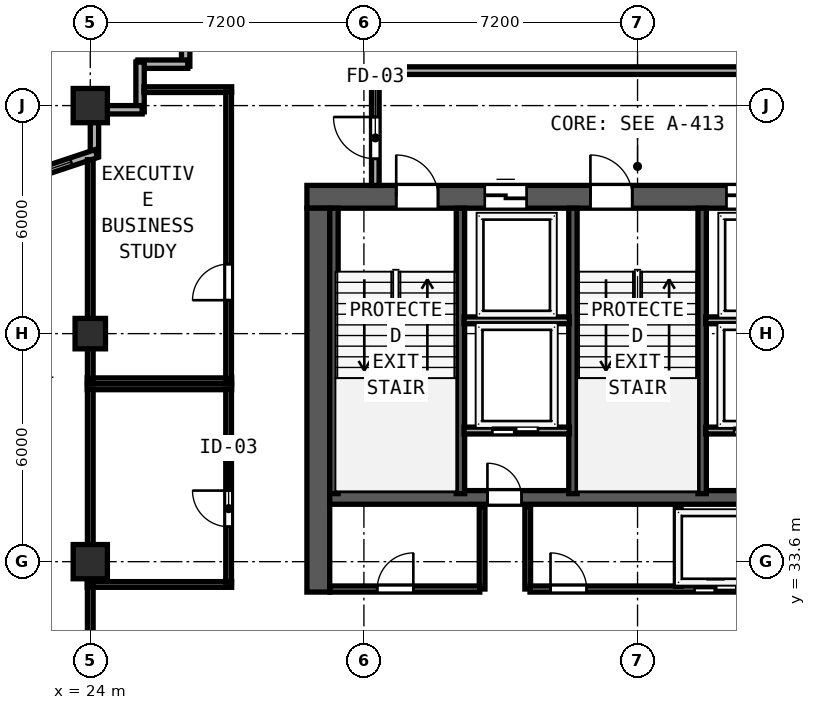
"""IFC4 building model, lengths in metres.
Left out: names, types, materials, properties, quantities, classifications, styles, units other than length and angle.
Written with IfcOpenShell. Run it as: python <this file> out.ifc"""

import sys

from ifc_helpers import new_model, si_unit, direction, frame, frame_2d, origin, origin_2d, place, context, subcontext, project, spatial, rectangle, hollow_rectangle, extrude, element, fill, save


model = new_model("IFC4")
c1 = context("Model", 3, precision=1e-05, world=origin(), true_north=direction((0.0, 1.0)))
c2 = subcontext(c1, "Body", "Model", "MODEL_VIEW")
j1 = project(units=[si_unit("LENGTHUNIT", "METRE"), si_unit("PLANEANGLEUNIT", "RADIAN")], contexts=[c1])
p1 = place(None, origin())
s1 = spatial("IfcSite", under=j1, at=p1, CompositionType="ELEMENT")
p2 = place(p1, origin())
s2 = spatial("IfcBuilding", under=s1, at=p2, CompositionType="ELEMENT")
p3 = place(p2, frame((0.0, 0.0, 199.4)))
s3 = spatial("IfcBuildingStorey", under=s2, at=p3, CompositionType="ELEMENT", Elevation=199.4)
p4 = place(p3, frame((29.7, 43.2, 0.0), z_axis=(0.0, 0.0, 1.0), x_axis=(1.0, 0.0, 0.0)))
e1 = element("IfcWall", 1, at=p4, inside=s3, PredefinedType="SHEAR", context=c2, shape_type="SweptSolid", body=[
    extrude(rectangle(XDim=17.4, YDim=0.6, at=frame_2d((8.7, 0.0))), origin(), (0.0, 0.0, 1.0), 3.62),
])
p5 = place(p4, frame((2.35, 0.0, 0.0)))
e2 = element("IfcOpeningElement", 2, at=p5, cuts=e1, PredefinedType="OPENING", context=c2, shape_type="SweptSolid", body=[
    extrude(rectangle(XDim=1.1, YDim=2.15, at=frame_2d((0.55, 1.075))), frame((0.0, 0.31, 0.0), z_axis=(0.0, -1.0, 0.0), x_axis=(1.0, 0.0, 0.0)), (0.0, 0.0, 1.0), 0.62),
])
p6 = place(p4, frame((7.46, 0.0, 0.0)))
e3 = element("IfcOpeningElement", 3, at=p6, cuts=e1, PredefinedType="OPENING", context=c2, shape_type="SweptSolid", body=[
    extrude(rectangle(XDim=1.1, YDim=2.15, at=frame_2d((0.55, 1.075))), frame((0.0, 0.31, 0.0), z_axis=(0.0, -1.0, 0.0), x_axis=(1.0, 0.0, 0.0)), (0.0, 0.0, 1.0), 0.62),
])
p7 = place(p4, frame((13.55, 0.0, 0.0)))
e4 = element("IfcOpeningElement", 4, at=p7, cuts=e1, PredefinedType="OPENING", context=c2, shape_type="SweptSolid", body=[
    extrude(rectangle(XDim=1.1, YDim=2.15, at=frame_2d((0.55, 1.075))), frame((0.0, 0.31, 0.0), z_axis=(0.0, -1.0, 0.0), x_axis=(1.0, 0.0, 0.0)), (0.0, 0.0, 1.0), 0.62),
])
p8 = place(p4, frame((4.68, 0.0, 0.0)))
e5 = element("IfcOpeningElement", 5, at=p8, cuts=e1, PredefinedType="OPENING", context=c2, shape_type="SweptSolid", body=[
    extrude(rectangle(XDim=1.1, YDim=2.2, at=frame_2d((0.55, 1.1))), frame((0.0, 0.31, 0.0), z_axis=(0.0, -1.0, 0.0), x_axis=(1.0, 0.0, 0.0)), (0.0, 0.0, 1.0), 0.62),
])
p9 = place(p4, frame((11.04, 0.0, 0.0)))
e6 = element("IfcOpeningElement", 6, at=p9, cuts=e1, PredefinedType="OPENING", context=c2, shape_type="SweptSolid", body=[
    extrude(rectangle(XDim=1.1, YDim=2.2, at=frame_2d((0.55, 1.1))), frame((0.0, 0.31, 0.0), z_axis=(0.0, -1.0, 0.0), x_axis=(1.0, 0.0, 0.0)), (0.0, 0.0, 1.0), 0.62),
])
p10 = place(p3, frame((30.0, 32.8, 0.0), z_axis=(0.0, 0.0, 1.0), x_axis=(0.0, 1.0, 0.0)))
e7 = element("IfcWall", 7, at=p10, inside=s3, PredefinedType="SHEAR", context=c2, shape_type="SweptSolid", body=[
    extrude(rectangle(XDim=10.1, YDim=0.6, at=frame_2d((5.05, 0.0))), origin(), (0.0, 0.0, 1.0), 3.62),
])
p11 = place(p3, frame((30.3, 35.29, 0.0), z_axis=(0.0, 0.0, 1.0), x_axis=(1.0, 0.0, 0.0)))
e8 = element("IfcWall", 8, at=p11, inside=s3, PredefinedType="SHEAR", context=c2, shape_type="SweptSolid", body=[
    extrude(rectangle(XDim=16.2, YDim=0.36, at=frame_2d((8.1, 0.0))), origin(), (0.0, 0.0, 1.0), 3.62),
])
p12 = place(p11, frame((5.05, 0.0, 0.0), z_axis=(0.0, 0.0, 1.0), x_axis=(-1.0, 0.0, 0.0)))
e9 = element("IfcOpeningElement", 9, at=p12, cuts=e8, PredefinedType="OPENING", context=c2, shape_type="SweptSolid", body=[
    extrude(rectangle(XDim=0.9, YDim=2.1, at=frame_2d((0.45, 1.05))), frame((0.0, 0.19, 0.0), z_axis=(0.0, -1.0, 0.0), x_axis=(1.0, 0.0, 0.0)), (0.0, 0.0, 1.0), 0.38),
])
p13 = place(p11, frame((12.11, 0.0, 0.0), z_axis=(0.0, 0.0, 1.0), x_axis=(-1.0, 0.0, 0.0)))
e10 = element("IfcOpeningElement", 10, at=p13, cuts=e8, PredefinedType="OPENING", context=c2, shape_type="SweptSolid", body=[
    extrude(rectangle(XDim=0.9, YDim=2.1, at=frame_2d((0.45, 1.05))), frame((0.0, 0.19, 0.0), z_axis=(0.0, -1.0, 0.0), x_axis=(1.0, 0.0, 0.0)), (0.0, 0.0, 1.0), 0.38),
])
for number, where, z_axis, x_axis in (
    (11, (30.412, 35.39, 0.0), (0.0, 0.0, 1.0), (0.0, 1.0, 0.0)),
    (12, (33.74, 35.39, 0.0), (0.0, 0.0, 1.0), (0.0, 1.0, 0.0)),
    (13, (36.7, 35.39, 0.0), (0.0, 0.0, 1.0), (0.0, 1.0, 0.0)),
    (14, (40.1, 35.39, 0.0), (0.0, 0.0, 1.0), (0.0, 1.0, 0.0)),
):
    element("IfcWall", number, at=place(p3, frame(where, z_axis=z_axis, x_axis=x_axis)), inside=s3, PredefinedType="SHEAR", context=c2, shape_type="SweptSolid", body=[
        extrude(rectangle(XDim=7.51, YDim=0.22, at=frame_2d((3.755, 0.0))), origin(), (0.0, 0.0, 1.0), 3.62),
    ])
for number, where, z_axis, x_axis in (
    (15, (24.0, 33.6, 0.0), (0.0, 0.0, 1.0), (1.0, 0.0, 0.0)),
    (16, (24.0, 45.6, 0.0), (0.0, 0.0, 1.0), (1.0, 0.0, 0.0)),
):
    element("IfcColumn", number, at=place(p3, frame(where, z_axis=z_axis, x_axis=x_axis)), inside=s3, PredefinedType="COLUMN", context=c2, shape_type="SweptSolid", body=[
        extrude(hollow_rectangle(XDim=0.9, YDim=0.9, WallThickness=0.034, at=origin_2d()), origin(), (0.0, 0.0, 1.0), 3.8),
    ])
p14 = place(p3, frame((24.0, 39.6, 0.0), z_axis=(0.0, 0.0, 1.0), x_axis=(1.0, 0.0, 0.0)))
e17 = element("IfcColumn", 17, at=p14, inside=s3, PredefinedType="COLUMN", context=c2, shape_type="SweptSolid", body=[
    extrude(hollow_rectangle(XDim=0.8, YDim=0.8, WallThickness=0.03, at=origin_2d()), origin(), (0.0, 0.0, 1.0), 3.8),
])
p15 = place(p3, frame((26.51, 48.0, 0.0), z_axis=(0.0, 0.0, 1.0), x_axis=(0.0, -1.0, 0.0)))
e18 = element("IfcWall", 18, at=p15, inside=s3, PredefinedType="SOLIDWALL", context=c2, shape_type="SweptSolid", body=[
    extrude(rectangle(XDim=1.365, YDim=0.22, at=frame_2d((0.683, 0.0))), origin(), (0.0, 0.0, 1.0), 3.62),
])
for number, where, z_axis, x_axis in (
    (19, (26.565, 46.69, 0.0), (0.0, 0.0, 1.0), (-1.0, 0.0, 0.0)),
    (20, (25.31, 46.745, 0.0), (0.0, 0.0, 1.0), (0.0, -1.0, 0.0)),
):
    element("IfcWall", number, at=place(p3, frame(where, z_axis=z_axis, x_axis=x_axis)), inside=s3, PredefinedType="SOLIDWALL", context=c2, shape_type="SweptSolid", body=[
        extrude(rectangle(XDim=1.31, YDim=0.22, at=frame_2d((0.655, 0.0))), origin(), (0.0, 0.0, 1.0), 3.62),
    ])
p16 = place(p3, frame((25.365, 45.49, 0.0), z_axis=(0.0, 0.0, 1.0), x_axis=(-1.0, 0.0, 0.0)))
e21 = element("IfcWall", 21, at=p16, inside=s3, PredefinedType="SOLIDWALL", context=c2, shape_type="SweptSolid", body=[
    extrude(rectangle(XDim=0.923, YDim=0.22, at=frame_2d((0.461, 0.0))), origin(), (0.0, 0.0, 1.0), 3.62),
])
p17 = place(p3, frame((24.11, 45.158, 0.0), z_axis=(0.0, 0.0, 1.0), x_axis=(0.0, -1.0, 0.0)))
e22 = element("IfcWall", 22, at=p17, inside=s3, PredefinedType="SOLIDWALL", context=c2, shape_type="SweptSolid", body=[
    extrude(rectangle(XDim=0.892, YDim=0.22, at=frame_2d((0.446, 0.0))), origin(), (0.0, 0.0, 1.0), 3.215),
])
p18 = place(p3, frame((24.162, 44.338, 0.0), z_axis=(0.0, 0.0, 1.0), x_axis=(-0.948687265055, -0.316215864755, 0.0)))
e23 = element("IfcWall", 23, at=p18, inside=s3, PredefinedType="SOLIDWALL", context=c2, shape_type="SweptSolid", body=[
    extrude(rectangle(XDim=6.154, YDim=0.22, at=frame_2d((3.077, 0.0))), origin(), (0.0, 0.0, 1.0), 3.215),
])
p19 = place(p18, frame((0.7, 0.0, 0.85)))
e24 = element("IfcOpeningElement", 24, at=p19, cuts=e23, PredefinedType="OPENING", context=c2, shape_type="SweptSolid", body=[
    extrude(rectangle(XDim=1.1, YDim=1.75, at=frame_2d((0.55, 0.875))), frame((0.0, 0.12, 0.0), z_axis=(0.0, -1.0, 0.0), x_axis=(1.0, 0.0, 0.0)), (0.0, 0.0, 1.0), 0.24),
])
p20 = place(p3, frame((31.5, 46.52, 0.0), z_axis=(0.0, 0.0, 1.0), x_axis=(1.0, 0.0, 0.0)))
e25 = element("IfcWall", 25, at=p20, inside=s3, PredefinedType="SOLIDWALL", context=c2, shape_type="SweptSolid", body=[
    extrude(rectangle(XDim=13.8, YDim=0.2, at=frame_2d((6.9, 0.0))), origin(), (0.0, 0.0, 1.0), 3.62),
])
p21 = place(p3, frame((31.5, 43.5, 0.0), z_axis=(0.0, 0.0, 1.0), x_axis=(0.0, 1.0, 0.0)))
e26 = element("IfcWall", 26, at=p21, inside=s3, PredefinedType="SOLIDWALL", context=c2, shape_type="SweptSolid", body=[
    extrude(rectangle(XDim=2.935, YDim=0.2, at=frame_2d((1.468, 0.0))), origin(), (0.0, 0.0, 1.0), 3.62),
])
p22 = place(p21, frame((1.8, 0.0, 0.0), z_axis=(0.0, 0.0, 1.0), x_axis=(-1.0, 0.0, 0.0)))
e27 = element("IfcOpeningElement", 27, at=p22, cuts=e26, PredefinedType="OPENING", context=c2, shape_type="SweptSolid", body=[
    extrude(rectangle(XDim=1.1, YDim=2.15, at=frame_2d((0.55, 1.075))), frame((0.0, 0.11, 0.0), z_axis=(0.0, -1.0, 0.0), x_axis=(1.0, 0.0, 0.0)), (0.0, 0.0, 1.0), 0.22),
])
for number, where, z_axis, x_axis in (
    (28, (33.835, 39.95, 0.0), (0.0, 0.0, 1.0), (1.0, 0.0, 0.0)),
    (29, (40.195, 39.95, 0.0), (0.0, 0.0, 1.0), (1.0, 0.0, 0.0)),
):
    element("IfcWall", number, at=place(p3, frame(where, z_axis=z_axis, x_axis=x_axis)), inside=s3, PredefinedType="SOLIDWALL", context=c2, shape_type="SweptSolid", body=[
        extrude(rectangle(XDim=2.77, YDim=0.18, at=frame_2d((1.385, 0.0))), origin(), (0.0, 0.0, 1.0), 3.62),
    ])
p23 = place(p3, frame((33.835, 37.05, 0.0), z_axis=(0.0, 0.0, 1.0), x_axis=(1.0, 0.0, 0.0)))
e30 = element("IfcWall", 30, at=p23, inside=s3, PredefinedType="SOLIDWALL", context=c2, shape_type="SweptSolid", body=[
    extrude(rectangle(XDim=2.77, YDim=0.18, at=frame_2d((1.385, 0.0))), origin(), (0.0, 0.0, 1.0), 3.62),
])
p24 = place(p23, frame((1.945, 0.0, 0.0), z_axis=(0.0, 0.0, 1.0), x_axis=(-1.0, 0.0, 0.0)))
e31 = element("IfcOpeningElement", 31, at=p24, cuts=e30, PredefinedType="OPENING", context=c2, shape_type="SweptSolid", body=[
    extrude(rectangle(XDim=1.2, YDim=2.2, at=frame_2d((0.6, 1.1))), frame((0.0, 0.1, 0.0), z_axis=(0.0, -1.0, 0.0), x_axis=(1.0, 0.0, 0.0)), (0.0, 0.0, 1.0), 0.2),
])
for number, where, z_axis, x_axis in (
    (32, (34.31, 32.88, 0.0), (0.0, 0.0, 1.0), (0.0, 1.0, 0.0)),
    (33, (35.51, 32.88, 0.0), (0.0, 0.0, 1.0), (0.0, 1.0, 0.0)),
):
    element("IfcWall", number, at=place(p3, frame(where, z_axis=z_axis, x_axis=x_axis)), inside=s3, PredefinedType="SOLIDWALL", context=c2, shape_type="SweptSolid", body=[
        extrude(rectangle(XDim=2.17, YDim=0.15, at=frame_2d((1.085, 0.0))), origin(), (0.0, 0.0, 1.0), 3.62),
    ])
p25 = place(p3, frame((40.195, 37.05, 0.0), z_axis=(0.0, 0.0, 1.0), x_axis=(1.0, 0.0, 0.0)))
e34 = element("IfcWall", 34, at=p25, inside=s3, PredefinedType="SOLIDWALL", context=c2, shape_type="SweptSolid", body=[
    extrude(rectangle(XDim=2.77, YDim=0.18, at=frame_2d((1.385, 0.0))), origin(), (0.0, 0.0, 1.0), 3.62),
])
p26 = place(p25, frame((1.945, 0.0, 0.0), z_axis=(0.0, 0.0, 1.0), x_axis=(-1.0, 0.0, 0.0)))
e35 = element("IfcOpeningElement", 35, at=p26, cuts=e34, PredefinedType="OPENING", context=c2, shape_type="SweptSolid", body=[
    extrude(rectangle(XDim=1.2, YDim=2.2, at=frame_2d((0.6, 1.1))), frame((0.0, 0.1, 0.0), z_axis=(0.0, -1.0, 0.0), x_axis=(1.0, 0.0, 0.0)), (0.0, 0.0, 1.0), 0.2),
])
p27 = place(p3, frame((30.3, 32.88, 0.0), z_axis=(0.0, 0.0, 1.0), x_axis=(1.0, 0.0, 0.0)))
e36 = element("IfcWall", 36, at=p27, inside=s3, PredefinedType="SOLIDWALL", context=c2, shape_type="SweptSolid", body=[
    extrude(rectangle(XDim=3.95, YDim=0.16, at=frame_2d((1.975, 0.0))), origin(), (0.0, 0.0, 1.0), 3.62),
])
p28 = place(p27, frame((2.2, 0.0, 0.0), z_axis=(0.0, 0.0, 1.0), x_axis=(-1.0, 0.0, 0.0)))
e37 = element("IfcOpeningElement", 37, at=p28, cuts=e36, PredefinedType="OPENING", context=c2, shape_type="SweptSolid", body=[
    extrude(rectangle(XDim=0.95, YDim=2.12, at=frame_2d((0.475, 1.06))), frame((0.0, 0.09, 0.0), z_axis=(0.0, -1.0, 0.0), x_axis=(1.0, 0.0, 0.0)), (0.0, 0.0, 1.0), 0.18),
])
p29 = place(p3, frame((35.57, 32.88, 0.0), z_axis=(0.0, 0.0, 1.0), x_axis=(1.0, 0.0, 0.0)))
e38 = element("IfcWall", 38, at=p29, inside=s3, PredefinedType="SOLIDWALL", context=c2, shape_type="SweptSolid", body=[
    extrude(rectangle(XDim=5.74, YDim=0.16, at=frame_2d((2.87, 0.0))), origin(), (0.0, 0.0, 1.0), 3.62),
])
p30 = place(p29, frame((1.49, 0.0, 0.0), z_axis=(0.0, 0.0, 1.0), x_axis=(-1.0, 0.0, 0.0)))
e39 = element("IfcOpeningElement", 39, at=p30, cuts=e38, PredefinedType="OPENING", context=c2, shape_type="SweptSolid", body=[
    extrude(rectangle(XDim=0.95, YDim=2.12, at=frame_2d((0.475, 1.06))), frame((0.0, 0.09, 0.0), z_axis=(0.0, -1.0, 0.0), x_axis=(1.0, 0.0, 0.0)), (0.0, 0.0, 1.0), 0.18),
])
p31 = place(p29, frame((5.43, 0.0, 0.0), z_axis=(0.0, 0.0, 1.0), x_axis=(-1.0, 0.0, 0.0)))
e40 = element("IfcOpeningElement", 40, at=p31, cuts=e38, PredefinedType="OPENING", context=c2, shape_type="SweptSolid", body=[
    extrude(rectangle(XDim=1.1, YDim=2.2, at=frame_2d((0.55, 1.1))), frame((0.0, 0.09, 0.0), z_axis=(0.0, -1.0, 0.0), x_axis=(1.0, 0.0, 0.0)), (0.0, 0.0, 1.0), 0.18),
])
p32 = place(p3, frame((39.47, 32.95, 0.0), z_axis=(0.0, 0.0, 1.0), x_axis=(0.0, 1.0, 0.0)))
e41 = element("IfcWall", 41, at=p32, inside=s3, PredefinedType="SOLIDWALL", context=c2, shape_type="SweptSolid", body=[
    extrude(rectangle(XDim=2.05, YDim=0.15, at=frame_2d((1.025, 0.0))), origin(), (0.0, 0.0, 1.0), 3.62),
])
for number, where, z_axis, x_axis in (
    (42, (23.92, 38.2, 0.0), (0.0, 0.0, 1.0), (1.0, 0.0, 0.0)),
    (43, (23.92, 33.0, 0.0), (0.0, 0.0, 1.0), (1.0, 0.0, 0.0)),
):
    element("IfcWall", number, at=place(p3, frame(where, z_axis=z_axis, x_axis=x_axis)), inside=s3, PredefinedType="PARTITIONING", context=c2, shape_type="SweptSolid", body=[
        extrude(rectangle(XDim=3.8, YDim=0.15, at=frame_2d((1.9, 0.0))), origin(), (0.0, 0.0, 1.0), 3.62),
    ])
p33 = place(p3, frame((24.0, 33.06, 0.0), z_axis=(0.0, 0.0, 1.0), x_axis=(0.0, 1.0, 0.0)))
e44 = element("IfcWall", 44, at=p33, inside=s3, PredefinedType="PARTITIONING", context=c2, shape_type="SweptSolid", body=[
    extrude(rectangle(XDim=5.08, YDim=0.15, at=frame_2d((2.54, 0.0))), origin(), (0.0, 0.0, 1.0), 3.215),
])
p34 = place(p3, frame((27.64, 33.06, 0.0), z_axis=(0.0, 0.0, 1.0), x_axis=(0.0, 1.0, 0.0)))
e45 = element("IfcWall", 45, at=p34, inside=s3, PredefinedType="PARTITIONING", context=c2, shape_type="SweptSolid", body=[
    extrude(rectangle(XDim=5.08, YDim=0.15, at=frame_2d((2.54, 0.0))), origin(), (0.0, 0.0, 1.0), 3.62),
])
p35 = place(p34, frame((2.41, 0.0, 0.0), z_axis=(0.0, 0.0, 1.0), x_axis=(-1.0, 0.0, 0.0)))
e46 = element("IfcOpeningElement", 46, at=p35, cuts=e45, PredefinedType="OPENING", context=c2, shape_type="SweptSolid", body=[
    extrude(rectangle(XDim=0.95, YDim=2.12, at=frame_2d((0.475, 1.06))), frame((0.0, 0.085, 0.0), z_axis=(0.0, -1.0, 0.0), x_axis=(1.0, 0.0, 0.0)), (0.0, 0.0, 1.0), 0.17),
])
p36 = place(p3, frame((25.412, 46.02, 0.0), z_axis=(0.0, 0.0, 1.0), x_axis=(1.0, 0.0, 0.0)))
e47 = element("IfcWall", 47, at=p36, inside=s3, PredefinedType="PARTITIONING", context=c2, shape_type="SweptSolid", body=[
    extrude(rectangle(XDim=2.308, YDim=0.15, at=frame_2d((1.154, 0.0))), origin(), (0.0, 0.0, 1.0), 3.62),
])
p37 = place(p3, frame((23.92, 38.36, 0.0), z_axis=(0.0, 0.0, 1.0), x_axis=(1.0, 0.0, 0.0)))
e48 = element("IfcWall", 48, at=p37, inside=s3, PredefinedType="PARTITIONING", context=c2, shape_type="SweptSolid", body=[
    extrude(rectangle(XDim=3.8, YDim=0.15, at=frame_2d((1.9, 0.0))), origin(), (0.0, 0.0, 1.0), 3.62),
])
p38 = place(p3, frame((24.0, 38.42, 0.0), z_axis=(0.0, 0.0, 1.0), x_axis=(0.0, 1.0, 0.0)))
e49 = element("IfcWall", 49, at=p38, inside=s3, PredefinedType="PARTITIONING", context=c2, shape_type="SweptSolid", body=[
    extrude(rectangle(XDim=5.757, YDim=0.15, at=frame_2d((2.878, 0.0))), origin(), (0.0, 0.0, 1.0), 3.215),
])
p39 = place(p3, frame((27.64, 38.42, 0.0), z_axis=(0.0, 0.0, 1.0), x_axis=(0.0, 1.0, 0.0)))
e50 = element("IfcWall", 50, at=p39, inside=s3, PredefinedType="PARTITIONING", context=c2, shape_type="SweptSolid", body=[
    extrude(rectangle(XDim=7.54, YDim=0.15, at=frame_2d((3.77, 0.0))), origin(), (0.0, 0.0, 1.0), 3.62),
])
p40 = place(p39, frame((3.01, 0.0, 0.0), z_axis=(0.0, 0.0, 1.0), x_axis=(-1.0, 0.0, 0.0)))
e51 = element("IfcOpeningElement", 51, at=p40, cuts=e50, PredefinedType="OPENING", context=c2, shape_type="SweptSolid", body=[
    extrude(rectangle(XDim=0.95, YDim=2.12, at=frame_2d((0.475, 1.06))), frame((0.0, 0.085, 0.0), z_axis=(0.0, -1.0, 0.0), x_axis=(1.0, 0.0, 0.0)), (0.0, 0.0, 1.0), 0.17),
])
p41 = place(p3, frame((24.0, 31.39, 0.0), z_axis=(0.0, 0.0, 1.0), x_axis=(0.0, 1.0, 0.0)))
e52 = element("IfcWall", 52, at=p41, inside=s3, PredefinedType="PARTITIONING", context=c2, shape_type="SweptSolid", body=[
    extrude(rectangle(XDim=1.55, YDim=0.15, at=frame_2d((0.775, 0.0))), origin(), (0.0, 0.0, 1.0), 3.215),
])
p42 = place(p19, origin())
e53 = element("IfcWindow", 53, at=p42, inside=s3, PartitioningType="SINGLE_PANEL", PredefinedType="WINDOW", context=c2, shape_type="SweptSolid", body=[
    extrude(rectangle(XDim=1.1, YDim=1.75, at=frame_2d((0.55, 0.875))), frame((0.0, 0.03, 0.0), z_axis=(0.0, -1.0, 0.0), x_axis=(1.0, 0.0, 0.0)), (0.0, 0.0, 1.0), 0.06),
])
fill(e24, e53)
p43 = place(p5, origin())
e54 = element("IfcDoor", 54, at=p43, inside=s3, OperationType="SINGLE_SWING_LEFT", PredefinedType="DOOR", context=c2, shape_type="SweptSolid", body=[
    extrude(rectangle(XDim=1.1, YDim=2.15, at=frame_2d((0.55, 1.075))), frame((0.0, 0.185, 0.0), z_axis=(0.0, -1.0, 0.0), x_axis=(1.0, 0.0, 0.0)), (0.0, 0.0, 1.0), 0.05),
])
fill(e2, e54)
p44 = place(p6, origin())
e55 = element("IfcDoor", 55, at=p44, inside=s3, OperationType="SINGLE_SWING_LEFT", PredefinedType="DOOR", context=c2, shape_type="SweptSolid", body=[
    extrude(rectangle(XDim=1.1, YDim=2.15, at=frame_2d((0.55, 1.075))), frame((0.0, 0.185, 0.0), z_axis=(0.0, -1.0, 0.0), x_axis=(1.0, 0.0, 0.0)), (0.0, 0.0, 1.0), 0.05),
])
fill(e3, e55)
p45 = place(p22, origin())
e56 = element("IfcDoor", 56, at=p45, inside=s3, OperationType="SINGLE_SWING_LEFT", PredefinedType="DOOR", context=c2, shape_type="SweptSolid", body=[
    extrude(rectangle(XDim=1.1, YDim=2.15, at=frame_2d((0.55, 1.075))), frame((0.0, 0.025, 0.0), z_axis=(0.0, -1.0, 0.0), x_axis=(1.0, 0.0, 0.0)), (0.0, 0.0, 1.0), 0.05),
])
fill(e27, e56)
p46 = place(p8, origin())
e57 = element("IfcDoor", 57, at=p46, inside=s3, OperationType="SLIDING_TO_LEFT", PredefinedType="DOOR", context=c2, shape_type="SweptSolid", body=[
    extrude(rectangle(XDim=1.1, YDim=2.2, at=frame_2d((0.55, 1.1))), frame((0.0, 0.185, 0.0), z_axis=(0.0, -1.0, 0.0), x_axis=(1.0, 0.0, 0.0)), (0.0, 0.0, 1.0), 0.05),
])
fill(e5, e57)
p47 = place(p9, origin())
e58 = element("IfcDoor", 58, at=p47, inside=s3, OperationType="SLIDING_TO_LEFT", PredefinedType="DOOR", context=c2, shape_type="SweptSolid", body=[
    extrude(rectangle(XDim=1.1, YDim=2.2, at=frame_2d((0.55, 1.1))), frame((0.0, 0.185, 0.0), z_axis=(0.0, -1.0, 0.0), x_axis=(1.0, 0.0, 0.0)), (0.0, 0.0, 1.0), 0.05),
])
fill(e6, e58)
p48 = place(p24, origin())
e59 = element("IfcDoor", 59, at=p48, inside=s3, OperationType="SLIDING_TO_RIGHT", PredefinedType="DOOR", context=c2, shape_type="SweptSolid", body=[
    extrude(rectangle(XDim=1.2, YDim=2.2, at=frame_2d((0.6, 1.1))), frame((0.0, 0.025, 0.0), z_axis=(0.0, -1.0, 0.0), x_axis=(1.0, 0.0, 0.0)), (0.0, 0.0, 1.0), 0.05),
])
fill(e31, e59)
p49 = place(p12, origin())
e60 = element("IfcDoor", 60, at=p49, inside=s3, OperationType="SINGLE_SWING_RIGHT", PredefinedType="DOOR", context=c2, shape_type="SweptSolid", body=[
    extrude(rectangle(XDim=0.9, YDim=2.1, at=frame_2d((0.45, 1.05))), frame((0.0, 0.025, 0.0), z_axis=(0.0, -1.0, 0.0), x_axis=(1.0, 0.0, 0.0)), (0.0, 0.0, 1.0), 0.05),
])
fill(e9, e60)
p50 = place(p26, origin())
e61 = element("IfcDoor", 61, at=p50, inside=s3, OperationType="SLIDING_TO_RIGHT", PredefinedType="DOOR", context=c2, shape_type="SweptSolid", body=[
    extrude(rectangle(XDim=1.2, YDim=2.2, at=frame_2d((0.6, 1.1))), frame((0.0, 0.025, 0.0), z_axis=(0.0, -1.0, 0.0), x_axis=(1.0, 0.0, 0.0)), (0.0, 0.0, 1.0), 0.05),
])
fill(e35, e61)
p51 = place(p28, origin())
e62 = element("IfcDoor", 62, at=p51, inside=s3, OperationType="SINGLE_SWING_LEFT", PredefinedType="DOOR", context=c2, shape_type="SweptSolid", body=[
    extrude(rectangle(XDim=0.95, YDim=2.12, at=frame_2d((0.475, 1.06))), frame((0.0, 0.025, 0.0), z_axis=(0.0, -1.0, 0.0), x_axis=(1.0, 0.0, 0.0)), (0.0, 0.0, 1.0), 0.05),
])
fill(e37, e62)
p52 = place(p30, origin())
e63 = element("IfcDoor", 63, at=p52, inside=s3, OperationType="SINGLE_SWING_RIGHT", PredefinedType="DOOR", context=c2, shape_type="SweptSolid", body=[
    extrude(rectangle(XDim=0.95, YDim=2.12, at=frame_2d((0.475, 1.06))), frame((0.0, 0.025, 0.0), z_axis=(0.0, -1.0, 0.0), x_axis=(1.0, 0.0, 0.0)), (0.0, 0.0, 1.0), 0.05),
])
fill(e39, e63)
p53 = place(p31, origin())
e64 = element("IfcDoor", 64, at=p53, inside=s3, OperationType="SLIDING_TO_RIGHT", PredefinedType="DOOR", context=c2, shape_type="SweptSolid", body=[
    extrude(rectangle(XDim=1.1, YDim=2.2, at=frame_2d((0.55, 1.1))), frame((0.0, 0.025, 0.0), z_axis=(0.0, -1.0, 0.0), x_axis=(1.0, 0.0, 0.0)), (0.0, 0.0, 1.0), 0.05),
])
fill(e40, e64)
p54 = place(p35, origin())
e65 = element("IfcDoor", 65, at=p54, inside=s3, OperationType="SINGLE_SWING_LEFT", PredefinedType="DOOR", context=c2, shape_type="SweptSolid", body=[
    extrude(rectangle(XDim=0.95, YDim=2.12, at=frame_2d((0.475, 1.06))), frame((0.0, 0.025, 0.0), z_axis=(0.0, -1.0, 0.0), x_axis=(1.0, 0.0, 0.0)), (0.0, 0.0, 1.0), 0.05),
])
fill(e46, e65)
p55 = place(p40, origin())
e66 = element("IfcDoor", 66, at=p55, inside=s3, OperationType="SINGLE_SWING_RIGHT", PredefinedType="DOOR", context=c2, shape_type="SweptSolid", body=[
    extrude(rectangle(XDim=0.95, YDim=2.12, at=frame_2d((0.475, 1.06))), frame((0.0, 0.025, 0.0), z_axis=(0.0, -1.0, 0.0), x_axis=(1.0, 0.0, 0.0)), (0.0, 0.0, 1.0), 0.05),
])
fill(e51, e66)
save(model, sys.argv[1])
